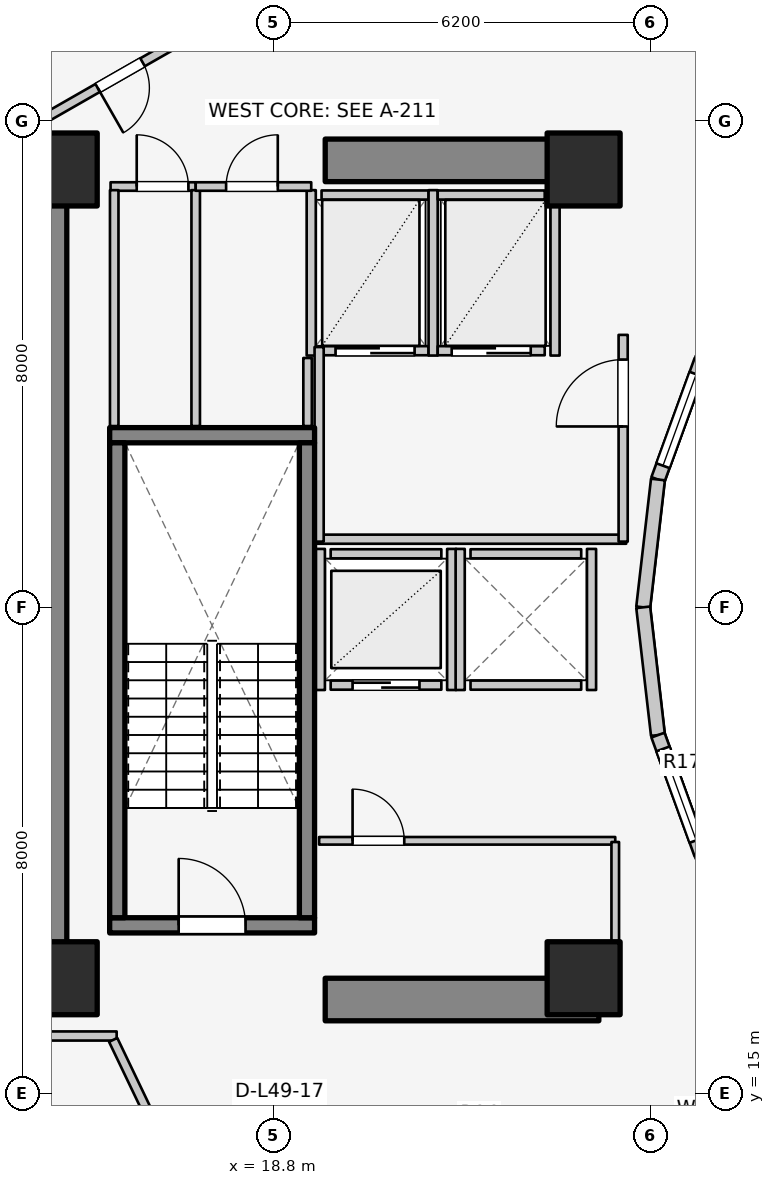
"""IFC4 building model, lengths in metres.
Left out: names, types, materials, properties, quantities, classifications, styles, units other than length and angle.
Written with IfcOpenShell. Run it as: python <this file> out.ifc"""

import sys

from ifc_helpers import new_model, si_unit, direction, frame, frame_2d, origin, origin_2d, place, context, subcontext, project, spatial, rectangle, extrude, element, fill, save


model = new_model("IFC4")
c1 = context("Model", 3, precision=1e-05, world=origin(), true_north=direction((0.0, 1.0)))
c2 = subcontext(c1, "Body", "Model", "MODEL_VIEW")
j1 = project(units=[si_unit("LENGTHUNIT", "METRE"), si_unit("PLANEANGLEUNIT", "RADIAN")], contexts=[c1])
p1 = place(None, origin())
s1 = spatial("IfcSite", under=j1, at=p1, CompositionType="ELEMENT")
p2 = place(p1, origin())
s2 = spatial("IfcBuilding", under=s1, at=p2, CompositionType="ELEMENT")
p3 = place(p2, frame((0.0, 0.0, 162.2)))
s3 = spatial("IfcBuildingStorey", under=s2, at=p3, CompositionType="ELEMENT", Elevation=162.2)
p4 = place(p3, frame((15.05, 17.05, 0.0), z_axis=(0.0, 0.0, 1.0), x_axis=(0.0, 1.0, 0.0)))
e1 = element("IfcWall", 1, at=p4, inside=s3, PredefinedType="SHEAR", context=c2, shape_type="SweptSolid", body=[
    extrude(rectangle(XDim=12.8, YDim=0.7, at=frame_2d((6.4, 0.0))), origin(), (0.0, 0.0, 1.0), 3.1),
])
for number, where, z_axis, x_axis in (
    (2, (19.65, 16.55, 0.0), (0.0, 0.0, 1.0), (1.0, 0.0, 0.0)),
    (3, (19.65, 30.35, 0.0), (0.0, 0.0, 1.0), (1.0, 0.0, 0.0)),
):
    element("IfcWall", number, at=place(p3, frame(where, z_axis=z_axis, x_axis=x_axis)), inside=s3, PredefinedType="SHEAR", context=c2, shape_type="SweptSolid", body=[
        extrude(rectangle(XDim=4.5, YDim=0.7, at=frame_2d((2.25, 0.0))), origin(), (0.0, 0.0, 1.0), 3.1),
    ])
p5 = place(p3, frame((16.105, 17.77, 0.0), z_axis=(0.0, 0.0, 1.0), x_axis=(1.0, 0.0, 0.0)))
e4 = element("IfcWall", 4, at=p5, inside=s3, PredefinedType="SOLIDWALL", context=c2, shape_type="SweptSolid", body=[
    extrude(rectangle(XDim=3.37, YDim=0.25, at=frame_2d((1.685, 0.0))), origin(), (0.0, 0.0, 1.0), 3.1),
])
p6 = place(p5, frame((1.135, 0.0, 0.0)))
e5 = element("IfcOpeningElement", 5, at=p6, cuts=e4, PredefinedType="OPENING", context=c2, shape_type="SweptSolid", body=[
    extrude(rectangle(XDim=1.1, YDim=2.1, at=frame_2d((0.55, 1.05))), frame((0.0, 0.135, 0.0), z_axis=(0.0, -1.0, 0.0), x_axis=(1.0, 0.0, 0.0)), (0.0, 0.0, 1.0), 0.27),
])
p7 = place(p3, frame((16.105, 25.83, 0.0), z_axis=(0.0, 0.0, 1.0), x_axis=(1.0, 0.0, 0.0)))
e6 = element("IfcWall", 6, at=p7, inside=s3, PredefinedType="SOLIDWALL", context=c2, shape_type="SweptSolid", body=[
    extrude(rectangle(XDim=3.37, YDim=0.25, at=frame_2d((1.685, 0.0))), origin(), (0.0, 0.0, 1.0), 3.1),
])
for number, where, z_axis, x_axis in (
    (7, (16.23, 17.895, 0.0), (0.0, 0.0, 1.0), (0.0, 1.0, 0.0)),
    (8, (19.35, 17.895, 0.0), (0.0, 0.0, 1.0), (0.0, 1.0, 0.0)),
):
    element("IfcWall", number, at=place(p3, frame(where, z_axis=z_axis, x_axis=x_axis)), inside=s3, PredefinedType="SOLIDWALL", context=c2, shape_type="SweptSolid", body=[
        extrude(rectangle(XDim=7.81, YDim=0.25, at=frame_2d((3.905, 0.0))), origin(), (0.0, 0.0, 1.0), 3.1),
    ])
for number, where, z_axis, x_axis in (
    (9, (15.3, 16.9, 0.0), (0.0, 0.0, 1.0), (1.0, 0.0, 0.0)),
    (10, (23.9, 16.9, 0.0), (0.0, 0.0, 1.0), (1.0, 0.0, 0.0)),
    (11, (23.9, 30.2, 0.0), (0.0, 0.0, 1.0), (1.0, 0.0, 0.0)),
    (12, (15.3, 30.2, 0.0), (0.0, 0.0, 1.0), (1.0, 0.0, 0.0)),
):
    element("IfcColumn", number, at=place(p3, frame(where, z_axis=z_axis, x_axis=x_axis)), inside=s3, PredefinedType="COLUMN", context=c2, shape_type="SweptSolid", body=[
        extrude(rectangle(XDim=1.2, YDim=1.2, at=origin_2d()), origin(), (0.0, 0.0, 1.0), 3.1),
    ])
p8 = place(p3, frame((25.834, 27.06, 0.0), z_axis=(0.0, 0.0, 1.0), x_axis=(-0.341423187295, -0.93990968033, 0.0)))
e13 = element("IfcWall", 13, at=p8, inside=s3, PredefinedType="STANDARD", context=c2, shape_type="SweptSolid", body=[
    extrude(rectangle(XDim=2.084, YDim=0.23, at=frame_2d((1.042, 0.0))), origin(), (0.0, 0.0, 1.0), 2.84),
])
p9 = place(p8, frame((0.242, 0.0, 0.85)))
e14 = element("IfcOpeningElement", 14, at=p9, cuts=e13, PredefinedType="OPENING", context=c2, shape_type="SweptSolid", body=[
    extrude(rectangle(XDim=1.6, YDim=1.65, at=frame_2d((0.8, 0.825))), frame((0.0, 0.125, 0.0), z_axis=(0.0, -1.0, 0.0), x_axis=(1.0, 0.0, 0.0)), (0.0, 0.0, 1.0), 0.25),
])
for number, where, z_axis, x_axis in (
    (15, (25.123, 25.102, 0.0), (0.0, 0.0, 1.0), (-0.115, -0.993, 0.0)),
    (16, (24.88, 23.0, 0.0), (0.0, 0.0, 1.0), (0.115, -0.993, 0.0)),
):
    element("IfcWall", number, at=place(p3, frame(where, z_axis=z_axis, x_axis=x_axis)), inside=s3, PredefinedType="STANDARD", context=c2, shape_type="SweptSolid", body=[
        extrude(rectangle(XDim=2.115, YDim=0.23, at=frame_2d((1.058, 0.0))), origin(), (0.0, 0.0, 1.0), 2.84),
    ])
p10 = place(p3, frame((25.123, 20.898, 0.0), z_axis=(0.0, 0.0, 1.0), x_axis=(0.341423187295, -0.93990968033, 0.0)))
e17 = element("IfcWall", 17, at=p10, inside=s3, PredefinedType="STANDARD", context=c2, shape_type="SweptSolid", body=[
    extrude(rectangle(XDim=2.084, YDim=0.23, at=frame_2d((1.042, 0.0))), origin(), (0.0, 0.0, 1.0), 2.84),
])
p11 = place(p10, frame((0.242, 0.0, 0.85)))
e18 = element("IfcOpeningElement", 18, at=p11, cuts=e17, PredefinedType="OPENING", context=c2, shape_type="SweptSolid", body=[
    extrude(rectangle(XDim=1.6, YDim=1.65, at=frame_2d((0.8, 0.825))), frame((0.0, 0.125, 0.0), z_axis=(0.0, -1.0, 0.0), x_axis=(1.0, 0.0, 0.0)), (0.0, 0.0, 1.0), 0.25),
])
p12 = place(p3, frame((19.74, 21.72, 0.0), z_axis=(0.0, 0.0, 1.0), x_axis=(1.0, 0.0, 0.0)))
e19 = element("IfcWall", 19, at=p12, inside=s3, PredefinedType="SOLIDWALL", context=c2, shape_type="SweptSolid", body=[
    extrude(rectangle(XDim=1.82, YDim=0.15, at=frame_2d((0.91, 0.0))), origin(), (0.0, 0.0, 1.0), 2.855),
])
p13 = place(p12, frame((0.36, 0.0, 0.0)))
e20 = element("IfcOpeningElement", 20, at=p13, cuts=e19, PredefinedType="OPENING", context=c2, shape_type="SweptSolid", body=[
    extrude(rectangle(XDim=1.1, YDim=2.1, at=frame_2d((0.55, 1.05))), frame((0.0, 0.085, 0.0), z_axis=(0.0, -1.0, 0.0), x_axis=(1.0, 0.0, 0.0)), (0.0, 0.0, 1.0), 0.17),
])
p14 = place(p3, frame((19.74, 23.88, 0.0), z_axis=(0.0, 0.0, 1.0), x_axis=(1.0, 0.0, 0.0)))
e21 = element("IfcWall", 21, at=p14, inside=s3, PredefinedType="SOLIDWALL", context=c2, shape_type="SweptSolid", body=[
    extrude(rectangle(XDim=1.82, YDim=0.15, at=frame_2d((0.91, 0.0))), origin(), (0.0, 0.0, 1.0), 2.855),
])
for number, where, z_axis, x_axis in (
    (22, (19.57, 21.64, 0.0), (0.0, 0.0, 1.0), (0.0, 1.0, 0.0)),
    (23, (21.73, 21.64, 0.0), (0.0, 0.0, 1.0), (0.0, 1.0, 0.0)),
):
    element("IfcWall", number, at=place(p3, frame(where, z_axis=z_axis, x_axis=x_axis)), inside=s3, PredefinedType="SOLIDWALL", context=c2, shape_type="SweptSolid", body=[
        extrude(rectangle(XDim=2.32, YDim=0.15, at=frame_2d((1.16, 0.0))), origin(), (0.0, 0.0, 1.0), 2.855),
    ])
for number, where, z_axis, x_axis in (
    (24, (22.04, 21.72, 0.0), (0.0, 0.0, 1.0), (1.0, 0.0, 0.0)),
    (25, (22.04, 23.88, 0.0), (0.0, 0.0, 1.0), (1.0, 0.0, 0.0)),
):
    element("IfcWall", number, at=place(p3, frame(where, z_axis=z_axis, x_axis=x_axis)), inside=s3, PredefinedType="SOLIDWALL", context=c2, shape_type="SweptSolid", body=[
        extrude(rectangle(XDim=1.82, YDim=0.15, at=frame_2d((0.91, 0.0))), origin(), (0.0, 0.0, 1.0), 2.12),
    ])
p15 = place(p3, frame((21.87, 21.64, 0.0), z_axis=(0.0, 0.0, 1.0), x_axis=(0.0, 1.0, 0.0)))
e26 = element("IfcWall", 26, at=p15, inside=s3, PredefinedType="SOLIDWALL", context=c2, shape_type="SweptSolid", body=[
    extrude(rectangle(XDim=2.32, YDim=0.15, at=frame_2d((1.16, 0.0))), origin(), (0.0, 0.0, 1.0), 2.855),
])
p16 = place(p3, frame((24.03, 21.64, 0.0), z_axis=(0.0, 0.0, 1.0), x_axis=(0.0, 1.0, 0.0)))
e27 = element("IfcWall", 27, at=p16, inside=s3, PredefinedType="SOLIDWALL", context=c2, shape_type="SweptSolid", body=[
    extrude(rectangle(XDim=2.32, YDim=0.15, at=frame_2d((1.16, 0.0))), origin(), (0.0, 0.0, 1.0), 2.12),
])
p17 = place(p3, frame((19.59, 27.22, 0.0), z_axis=(0.0, 0.0, 1.0), x_axis=(1.0, 0.0, 0.0)))
e28 = element("IfcWall", 28, at=p17, inside=s3, PredefinedType="SOLIDWALL", context=c2, shape_type="SweptSolid", body=[
    extrude(rectangle(XDim=1.76, YDim=0.15, at=frame_2d((0.88, 0.0))), origin(), (0.0, 0.0, 1.0), 2.855),
])
p18 = place(p17, frame((0.23, 0.0, 0.0)))
e29 = element("IfcOpeningElement", 29, at=p18, cuts=e28, PredefinedType="OPENING", context=c2, shape_type="SweptSolid", body=[
    extrude(rectangle(XDim=1.3, YDim=2.1, at=frame_2d((0.65, 1.05))), frame((0.0, 0.085, 0.0), z_axis=(0.0, -1.0, 0.0), x_axis=(1.0, 0.0, 0.0)), (0.0, 0.0, 1.0), 0.17),
])
p19 = place(p3, frame((19.59, 29.78, 0.0), z_axis=(0.0, 0.0, 1.0), x_axis=(1.0, 0.0, 0.0)))
e30 = element("IfcWall", 30, at=p19, inside=s3, PredefinedType="SOLIDWALL", context=c2, shape_type="SweptSolid", body=[
    extrude(rectangle(XDim=1.76, YDim=0.15, at=frame_2d((0.88, 0.0))), origin(), (0.0, 0.0, 1.0), 2.855),
])
for number, where, z_axis, x_axis in (
    (31, (19.42, 27.14, 0.0), (0.0, 0.0, 1.0), (0.0, 1.0, 0.0)),
    (32, (21.425, 27.14, 0.0), (0.0, 0.0, 1.0), (0.0, 1.0, 0.0)),
):
    element("IfcWall", number, at=place(p3, frame(where, z_axis=z_axis, x_axis=x_axis)), inside=s3, PredefinedType="SOLIDWALL", context=c2, shape_type="SweptSolid", body=[
        extrude(rectangle(XDim=2.72, YDim=0.15, at=frame_2d((1.36, 0.0))), origin(), (0.0, 0.0, 1.0), 2.855),
    ])
p20 = place(p3, frame((21.5, 27.22, 0.0), z_axis=(0.0, 0.0, 1.0), x_axis=(1.0, 0.0, 0.0)))
e33 = element("IfcWall", 33, at=p20, inside=s3, PredefinedType="SOLIDWALL", context=c2, shape_type="SweptSolid", body=[
    extrude(rectangle(XDim=1.76, YDim=0.15, at=frame_2d((0.88, 0.0))), origin(), (0.0, 0.0, 1.0), 2.855),
])
p21 = place(p20, frame((0.23, 0.0, 0.0)))
e34 = element("IfcOpeningElement", 34, at=p21, cuts=e33, PredefinedType="OPENING", context=c2, shape_type="SweptSolid", body=[
    extrude(rectangle(XDim=1.3, YDim=2.1, at=frame_2d((0.65, 1.05))), frame((0.0, 0.085, 0.0), z_axis=(0.0, -1.0, 0.0), x_axis=(1.0, 0.0, 0.0)), (0.0, 0.0, 1.0), 0.17),
])
p22 = place(p3, frame((21.5, 29.78, 0.0), z_axis=(0.0, 0.0, 1.0), x_axis=(1.0, 0.0, 0.0)))
e35 = element("IfcWall", 35, at=p22, inside=s3, PredefinedType="SOLIDWALL", context=c2, shape_type="SweptSolid", body=[
    extrude(rectangle(XDim=1.76, YDim=0.15, at=frame_2d((0.88, 0.0))), origin(), (0.0, 0.0, 1.0), 2.855),
])
p23 = place(p3, frame((23.43, 27.14, 0.0), z_axis=(0.0, 0.0, 1.0), x_axis=(0.0, 1.0, 0.0)))
e36 = element("IfcWall", 36, at=p23, inside=s3, PredefinedType="SOLIDWALL", context=c2, shape_type="SweptSolid", body=[
    extrude(rectangle(XDim=2.72, YDim=0.15, at=frame_2d((1.36, 0.0))), origin(), (0.0, 0.0, 1.0), 2.855),
])
p24 = place(p3, frame((19.52, 24.12, 0.0), z_axis=(0.0, 0.0, 1.0), x_axis=(1.0, 0.0, 0.0)))
e37 = element("IfcWall", 37, at=p24, inside=s3, PredefinedType="PARTITIONING", context=c2, shape_type="SweptSolid", body=[
    extrude(rectangle(XDim=5.08, YDim=0.15, at=frame_2d((2.54, 0.0))), origin(), (0.0, 0.0, 1.0), 2.12),
])
p25 = place(p3, frame((19.55, 24.08, 0.0), z_axis=(0.0, 0.0, 1.0), x_axis=(0.0, 1.0, 0.0)))
e38 = element("IfcWall", 38, at=p25, inside=s3, PredefinedType="PARTITIONING", context=c2, shape_type="SweptSolid", body=[
    extrude(rectangle(XDim=3.2, YDim=0.15, at=frame_2d((1.6, 0.0))), origin(), (0.0, 0.0, 1.0), 2.855),
])
p26 = place(p3, frame((24.55, 24.08, 0.0), z_axis=(0.0, 0.0, 1.0), x_axis=(0.0, 1.0, 0.0)))
e39 = element("IfcWall", 39, at=p26, inside=s3, PredefinedType="PARTITIONING", context=c2, shape_type="SweptSolid", body=[
    extrude(rectangle(XDim=3.4, YDim=0.15, at=frame_2d((1.7, 0.0))), origin(), (0.0, 0.0, 1.0), 2.855),
])
p27 = place(p26, frame((1.894, 0.0, 0.0)))
e40 = element("IfcOpeningElement", 40, at=p27, cuts=e39, PredefinedType="OPENING", context=c2, shape_type="SweptSolid", body=[
    extrude(rectangle(XDim=1.1, YDim=2.1, at=frame_2d((0.55, 1.05))), frame((0.0, 0.085, 0.0), z_axis=(0.0, -1.0, 0.0), x_axis=(1.0, 0.0, 0.0)), (0.0, 0.0, 1.0), 0.17),
])
p28 = place(p3, frame((19.55, 19.16, 0.0), z_axis=(0.0, 0.0, 1.0), x_axis=(1.0, 0.0, 0.0)))
e41 = element("IfcWall", 41, at=p28, inside=s3, PredefinedType="PARTITIONING", context=c2, shape_type="SweptSolid", body=[
    extrude(rectangle(XDim=4.87, YDim=0.125, at=frame_2d((2.435, 0.0))), origin(), (0.0, 0.0, 1.0), 2.12),
])
p29 = place(p28, frame((0.55, 0.0, 0.0)))
e42 = element("IfcOpeningElement", 42, at=p29, cuts=e41, PredefinedType="OPENING", context=c2, shape_type="SweptSolid", body=[
    extrude(rectangle(XDim=0.85, YDim=2.05, at=frame_2d((0.425, 1.025))), frame((0.0, 0.073, 0.0), z_axis=(0.0, -1.0, 0.0), x_axis=(1.0, 0.0, 0.0)), (0.0, 0.0, 1.0), 0.145),
])
p30 = place(p3, frame((24.42, 17.1, 0.0), z_axis=(0.0, 0.0, 1.0), x_axis=(0.0, 1.0, 0.0)))
e43 = element("IfcWall", 43, at=p30, inside=s3, PredefinedType="PARTITIONING", context=c2, shape_type="SweptSolid", body=[
    extrude(rectangle(XDim=2.04, YDim=0.125, at=frame_2d((1.02, 0.0))), origin(), (0.0, 0.0, 1.0), 2.232),
])
p31 = place(p3, frame((16.12, 29.92, 0.0), z_axis=(0.0, 0.0, 1.0), x_axis=(1.0, 0.0, 0.0)))
e44 = element("IfcWall", 44, at=p31, inside=s3, PredefinedType="PLUMBINGWALL", context=c2, shape_type="SweptSolid", body=[
    extrude(rectangle(XDim=1.4, YDim=0.14, at=frame_2d((0.7, 0.0))), origin(), (0.0, 0.0, 1.0), 2.855),
])
p32 = place(p31, frame((0.43, 0.0, 0.0)))
e45 = element("IfcOpeningElement", 45, at=p32, cuts=e44, PredefinedType="OPENING", context=c2, shape_type="SweptSolid", body=[
    extrude(rectangle(XDim=0.85, YDim=2.05, at=frame_2d((0.425, 1.025))), frame((0.0, 0.08, 0.0), z_axis=(0.0, -1.0, 0.0), x_axis=(1.0, 0.0, 0.0)), (0.0, 0.0, 1.0), 0.16),
])
for number, where, z_axis, x_axis in (
    (46, (16.18, 25.98, 0.0), (0.0, 0.0, 1.0), (0.0, 1.0, 0.0)),
    (47, (17.52, 25.98, 0.0), (0.0, 0.0, 1.0), (0.0, 1.0, 0.0)),
):
    element("IfcWall", number, at=place(p3, frame(where, z_axis=z_axis, x_axis=x_axis)), inside=s3, PredefinedType="PLUMBINGWALL", context=c2, shape_type="SweptSolid", body=[
        extrude(rectangle(XDim=3.88, YDim=0.14, at=frame_2d((1.94, 0.0))), origin(), (0.0, 0.0, 1.0), 2.855),
    ])
p33 = place(p3, frame((17.52, 29.92, 0.0), z_axis=(0.0, 0.0, 1.0), x_axis=(1.0, 0.0, 0.0)))
e48 = element("IfcWall", 48, at=p33, inside=s3, PredefinedType="PLUMBINGWALL", context=c2, shape_type="SweptSolid", body=[
    extrude(rectangle(XDim=1.9, YDim=0.14, at=frame_2d((0.95, 0.0))), origin(), (0.0, 0.0, 1.0), 2.855),
])
p34 = place(p33, frame((0.5, 0.0, 0.0)))
e49 = element("IfcOpeningElement", 49, at=p34, cuts=e48, PredefinedType="OPENING", context=c2, shape_type="SweptSolid", body=[
    extrude(rectangle(XDim=0.85, YDim=2.05, at=frame_2d((0.425, 1.025))), frame((0.0, 0.08, 0.0), z_axis=(0.0, -1.0, 0.0), x_axis=(1.0, 0.0, 0.0)), (0.0, 0.0, 1.0), 0.16),
])
p35 = place(p3, frame((19.36, 25.98, 0.0), z_axis=(0.0, 0.0, 1.0), x_axis=(0.0, 1.0, 0.0)))
e50 = element("IfcWall", 50, at=p35, inside=s3, PredefinedType="PLUMBINGWALL", context=c2, shape_type="SweptSolid", body=[
    extrude(rectangle(XDim=1.12, YDim=0.14, at=frame_2d((0.56, 0.0))), origin(), (0.0, 0.0, 1.0), 2.855),
])
p36 = place(p3, frame((17.243, 32.305, 0.0), z_axis=(0.0, 0.0, 1.0), x_axis=(-0.867991349648, -0.496579315857, 0.0)))
e51 = element("IfcWall", 51, at=p36, inside=s3, PredefinedType="PARTITIONING", context=c2, shape_type="SweptSolid", body=[
    extrude(rectangle(XDim=2.567, YDim=0.15, at=frame_2d((1.283, 0.0))), origin(), (0.0, 0.0, 1.0), 2.22),
])
p37 = place(p36, frame((0.688, 0.0, 0.0)))
e52 = element("IfcOpeningElement", 52, at=p37, cuts=e51, PredefinedType="OPENING", context=c2, shape_type="SweptSolid", body=[
    extrude(rectangle(XDim=0.85, YDim=2.05, at=frame_2d((0.425, 1.025))), frame((0.0, 0.085, 0.0), z_axis=(0.0, -1.0, 0.0), x_axis=(1.0, 0.0, 0.0)), (0.0, 0.0, 1.0), 0.17),
])
p38 = place(p3, frame((10.96, 15.95, 0.0), z_axis=(0.0, 0.0, 1.0), x_axis=(1.0, 0.0, 0.0)))
e53 = element("IfcWall", 53, at=p38, inside=s3, PredefinedType="PARTITIONING", context=c2, shape_type="SweptSolid", body=[
    extrude(rectangle(XDim=5.26, YDim=0.15, at=frame_2d((2.63, 0.0))), origin(), (0.0, 0.0, 1.0), 2.22),
])
p39 = place(p3, frame((17.222, 13.675, 0.0), z_axis=(0.0, 0.0, 1.0), x_axis=(-0.431973389813, 0.901886351207, 0.0)))
e54 = element("IfcWall", 54, at=p39, inside=s3, PredefinedType="PARTITIONING", context=c2, shape_type="SweptSolid", body=[
    extrude(rectangle(XDim=2.452, YDim=0.15, at=frame_2d((1.226, 0.0))), origin(), (0.0, 0.0, 1.0), 2.855),
])
p40 = place(p9, origin())
e55 = element("IfcWindow", 55, at=p40, inside=s3, PartitioningType="SINGLE_PANEL", PredefinedType="WINDOW", context=c2, shape_type="SweptSolid", body=[
    extrude(rectangle(XDim=1.6, YDim=1.65, at=frame_2d((0.8, 0.825))), frame((0.0, 0.03, 0.0), z_axis=(0.0, -1.0, 0.0), x_axis=(1.0, 0.0, 0.0)), (0.0, 0.0, 1.0), 0.06),
])
fill(e14, e55)
p41 = place(p11, origin())
e56 = element("IfcWindow", 56, at=p41, inside=s3, PartitioningType="SINGLE_PANEL", PredefinedType="WINDOW", context=c2, shape_type="SweptSolid", body=[
    extrude(rectangle(XDim=1.6, YDim=1.65, at=frame_2d((0.8, 0.825))), frame((0.0, 0.03, 0.0), z_axis=(0.0, -1.0, 0.0), x_axis=(1.0, 0.0, 0.0)), (0.0, 0.0, 1.0), 0.06),
])
fill(e18, e56)
p42 = place(p6, origin())
e57 = element("IfcDoor", 57, at=p42, inside=s3, OperationType="SINGLE_SWING_LEFT", PredefinedType="DOOR", context=c2, shape_type="SweptSolid", body=[
    extrude(rectangle(XDim=1.1, YDim=2.1, at=frame_2d((0.55, 1.05))), frame((0.0, 0.025, 0.0), z_axis=(0.0, -1.0, 0.0), x_axis=(1.0, 0.0, 0.0)), (0.0, 0.0, 1.0), 0.05),
])
fill(e5, e57)
p43 = place(p13, origin())
e58 = element("IfcDoor", 58, at=p43, inside=s3, OperationType="DOUBLE_DOOR_SLIDING", PredefinedType="DOOR", context=c2, shape_type="SweptSolid", body=[
    extrude(rectangle(XDim=1.1, YDim=2.1, at=frame_2d((0.55, 1.05))), frame((0.0, 0.025, 0.0), z_axis=(0.0, -1.0, 0.0), x_axis=(1.0, 0.0, 0.0)), (0.0, 0.0, 1.0), 0.05),
])
fill(e20, e58)
p44 = place(p18, origin())
e59 = element("IfcDoor", 59, at=p44, inside=s3, OperationType="DOUBLE_DOOR_SLIDING", PredefinedType="DOOR", context=c2, shape_type="SweptSolid", body=[
    extrude(rectangle(XDim=1.3, YDim=2.1, at=frame_2d((0.65, 1.05))), frame((0.0, 0.025, 0.0), z_axis=(0.0, -1.0, 0.0), x_axis=(1.0, 0.0, 0.0)), (0.0, 0.0, 1.0), 0.05),
])
fill(e29, e59)
p45 = place(p21, origin())
e60 = element("IfcDoor", 60, at=p45, inside=s3, OperationType="DOUBLE_DOOR_SLIDING", PredefinedType="DOOR", context=c2, shape_type="SweptSolid", body=[
    extrude(rectangle(XDim=1.3, YDim=2.1, at=frame_2d((0.65, 1.05))), frame((0.0, 0.025, 0.0), z_axis=(0.0, -1.0, 0.0), x_axis=(1.0, 0.0, 0.0)), (0.0, 0.0, 1.0), 0.05),
])
fill(e34, e60)
p46 = place(p27, origin())
e61 = element("IfcDoor", 61, at=p46, inside=s3, OperationType="SINGLE_SWING_LEFT", PredefinedType="DOOR", context=c2, shape_type="SweptSolid", body=[
    extrude(rectangle(XDim=1.1, YDim=2.1, at=frame_2d((0.55, 1.05))), frame((0.0, 0.025, 0.0), z_axis=(0.0, -1.0, 0.0), x_axis=(1.0, 0.0, 0.0)), (0.0, 0.0, 1.0), 0.05),
])
fill(e40, e61)
p47 = place(p29, origin())
e62 = element("IfcDoor", 62, at=p47, inside=s3, OperationType="SINGLE_SWING_LEFT", PredefinedType="DOOR", context=c2, shape_type="SweptSolid", body=[
    extrude(rectangle(XDim=0.85, YDim=2.05, at=frame_2d((0.425, 1.025))), frame((0.0, 0.025, 0.0), z_axis=(0.0, -1.0, 0.0), x_axis=(1.0, 0.0, 0.0)), (0.0, 0.0, 1.0), 0.05),
])
fill(e42, e62)
p48 = place(p32, origin())
e63 = element("IfcDoor", 63, at=p48, inside=s3, OperationType="SINGLE_SWING_LEFT", PredefinedType="DOOR", context=c2, shape_type="SweptSolid", body=[
    extrude(rectangle(XDim=0.85, YDim=2.05, at=frame_2d((0.425, 1.025))), frame((0.0, 0.025, 0.0), z_axis=(0.0, -1.0, 0.0), x_axis=(1.0, 0.0, 0.0)), (0.0, 0.0, 1.0), 0.05),
])
fill(e45, e63)
p49 = place(p34, origin())
e64 = element("IfcDoor", 64, at=p49, inside=s3, OperationType="SINGLE_SWING_RIGHT", PredefinedType="DOOR", context=c2, shape_type="SweptSolid", body=[
    extrude(rectangle(XDim=0.85, YDim=2.05, at=frame_2d((0.425, 1.025))), frame((0.0, 0.025, 0.0), z_axis=(0.0, -1.0, 0.0), x_axis=(1.0, 0.0, 0.0)), (0.0, 0.0, 1.0), 0.05),
])
fill(e49, e64)
p50 = place(p37, origin())
e65 = element("IfcDoor", 65, at=p50, inside=s3, OperationType="SINGLE_SWING_RIGHT", PredefinedType="DOOR", context=c2, shape_type="SweptSolid", body=[
    extrude(rectangle(XDim=0.85, YDim=2.05, at=frame_2d((0.425, 1.025))), frame((0.0, 0.025, 0.0), z_axis=(0.0, -1.0, 0.0), x_axis=(1.0, 0.0, 0.0)), (0.0, 0.0, 1.0), 0.05),
])
fill(e52, e65)
save(model, sys.argv[1])
